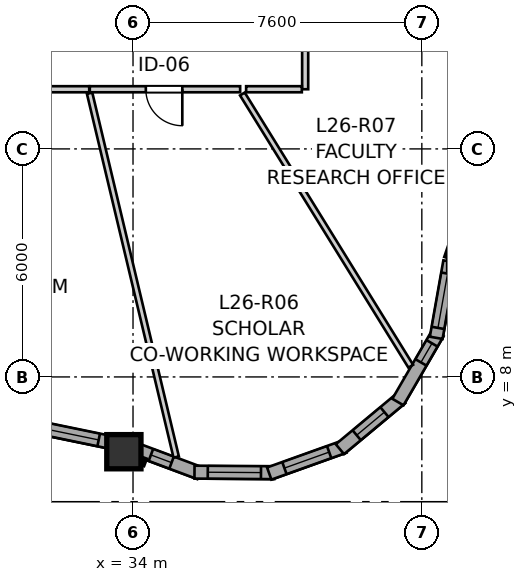
"""IFC4 building model, lengths in metres.
Left out: names, types, materials, properties, quantities, classifications, styles, units other than length and angle.
Written with IfcOpenShell. Run it as: python <this file> out.ifc"""

import sys

from ifc_helpers import new_model, si_unit, direction, frame, frame_2d, origin, origin_2d, place, context, subcontext, project, spatial, rectangle, extrude, source, transform, mapped, element, fill, save


model = new_model("IFC4")
c1 = context("Model", 3, precision=1e-05, world=origin(), true_north=direction((0.0, 1.0)))
c2 = subcontext(c1, "Body", "Model", "MODEL_VIEW")
j1 = project(units=[si_unit("LENGTHUNIT", "METRE"), si_unit("PLANEANGLEUNIT", "RADIAN")], contexts=[c1])
p1 = place(None, origin())
s1 = spatial("IfcSite", under=j1, at=p1, CompositionType="ELEMENT")
p2 = place(p1, origin())
s2 = spatial("IfcBuilding", under=s1, at=p2, CompositionType="ELEMENT")
p3 = place(p2, frame((0.0, 0.0, 89.6)))
s3 = spatial("IfcBuildingStorey", under=s2, at=p3, CompositionType="ELEMENT", Elevation=89.6)
m1 = source(origin(), c2, "Body", "SweptSolid", [
    extrude(rectangle(XDim=0.9, YDim=0.9, at=origin_2d()), origin(), (0.0, 0.0, 1.0), 2.95),
])
p4 = place(p3, frame((33.76, 6.032, 0.0), z_axis=(0.0, 0.0, 1.0), x_axis=(1.0, 0.0, 0.0)))
e1 = element("IfcColumn", 1, at=p4, inside=s3, PredefinedType="COLUMN", context=c2, shape_type="MappedRepresentation", body=[
    mapped(m1, transform((0.0, 0.0, 0.0), x_axis=(1.0, 0.0, 0.0), y_axis=(0.0, 1.0, 0.0), z_axis=(0.0, 0.0, 1.0), scale=1.0)),
])
p5 = place(p3, frame((30.705, 6.835, 0.0), z_axis=(0.0, 0.0, 1.0), x_axis=(0.979433750273, -0.201766024954, 0.0)))
e2 = element("IfcWall", 2, at=p5, inside=s3, PredefinedType="SOLIDWALL", context=c2, shape_type="SweptSolid", body=[
    extrude(rectangle(XDim=2.923, YDim=0.34, at=frame_2d((1.462, 0.0))), origin(), (0.0, 0.0, 1.0), 2.48),
])
p6 = place(p5, frame((0.492, 0.0, 0.82)))
e3 = element("IfcOpeningElement", 3, at=p6, cuts=e2, PredefinedType="OPENING", context=c2, shape_type="SweptSolid", body=[
    extrude(rectangle(XDim=1.95, YDim=1.4, at=frame_2d((0.975, 0.7))), frame((0.0, 0.18, 0.0), z_axis=(0.0, -1.0, 0.0), x_axis=(1.0, 0.0, 0.0)), (0.0, 0.0, 1.0), 0.36),
])
p7 = place(p3, frame((34.034, 6.111, 0.0), z_axis=(0.0, 0.0, 1.0), x_axis=(0.936815884802, -0.349822809409, 0.0)))
e4 = element("IfcWall", 4, at=p7, inside=s3, PredefinedType="SOLIDWALL", context=c2, shape_type="SweptSolid", body=[
    extrude(rectangle(XDim=1.831, YDim=0.34, at=frame_2d((0.916, 0.0))), origin(), (0.0, 0.0, 1.0), 2.48),
])
p8 = place(p7, frame((0.466, 0.0, 0.82)))
e5 = element("IfcOpeningElement", 5, at=p8, cuts=e4, PredefinedType="OPENING", context=c2, shape_type="SweptSolid", body=[
    extrude(rectangle(XDim=0.58, YDim=1.35, at=frame_2d((0.29, 0.675))), frame((0.0, 0.18, 0.0), z_axis=(0.0, -1.0, 0.0), x_axis=(1.0, 0.0, 0.0)), (0.0, 0.0, 1.0), 0.36),
])
p9 = place(p3, frame((35.618, 5.495, 0.0), z_axis=(0.0, 0.0, 1.0), x_axis=(0.999976451414, -0.006862697526, 0.0)))
e6 = element("IfcWall", 6, at=p9, inside=s3, PredefinedType="SOLIDWALL", context=c2, shape_type="SweptSolid", body=[
    extrude(rectangle(XDim=2.099, YDim=0.34, at=frame_2d((1.049, 0.0))), origin(), (0.0, 0.0, 1.0), 2.48),
])
p10 = place(p9, frame((0.35, 0.0, 0.82)))
e7 = element("IfcOpeningElement", 7, at=p10, cuts=e6, PredefinedType="OPENING", context=c2, shape_type="SweptSolid", body=[
    extrude(rectangle(XDim=1.4, YDim=1.35, at=frame_2d((0.7, 0.675))), frame((0.0, 0.18, 0.0), z_axis=(0.0, -1.0, 0.0), x_axis=(1.0, 0.0, 0.0)), (0.0, 0.0, 1.0), 0.36),
])
p11 = place(p3, frame((37.584, 5.458, 0.0), z_axis=(0.0, 0.0, 1.0), x_axis=(0.941473186867, 0.33708787936, 0.0)))
e8 = element("IfcWall", 8, at=p11, inside=s3, PredefinedType="SOLIDWALL", context=c2, shape_type="SweptSolid", body=[
    extrude(rectangle(XDim=2.099, YDim=0.34, at=frame_2d((1.049, 0.0))), origin(), (0.0, 0.0, 1.0), 2.48),
])
p12 = place(p11, frame((0.425, 0.0, 0.82)))
e9 = element("IfcOpeningElement", 9, at=p12, cuts=e8, PredefinedType="OPENING", context=c2, shape_type="SweptSolid", body=[
    extrude(rectangle(XDim=1.25, YDim=1.35, at=frame_2d((0.625, 0.675))), frame((0.0, 0.18, 0.0), z_axis=(0.0, -1.0, 0.0), x_axis=(1.0, 0.0, 0.0)), (0.0, 0.0, 1.0), 0.36),
])
p13 = place(p3, frame((39.444, 6.099, 0.0), z_axis=(0.0, 0.0, 1.0), x_axis=(0.768497696041, 0.639852554249, 0.0)))
e10 = element("IfcWall", 10, at=p13, inside=s3, PredefinedType="SOLIDWALL", context=c2, shape_type="SweptSolid", body=[
    extrude(rectangle(XDim=2.099, YDim=0.34, at=frame_2d((1.049, 0.0))), origin(), (0.0, 0.0, 1.0), 2.48),
])
p14 = place(p13, frame((0.574, 0.0, 0.82)))
e11 = element("IfcOpeningElement", 11, at=p14, cuts=e10, PredefinedType="OPENING", context=c2, shape_type="SweptSolid", body=[
    extrude(rectangle(XDim=0.95, YDim=1.35, at=frame_2d((0.475, 0.675))), frame((0.0, 0.18, 0.0), z_axis=(0.0, -1.0, 0.0), x_axis=(1.0, 0.0, 0.0)), (0.0, 0.0, 1.0), 0.36),
])
p15 = place(p3, frame((40.971, 7.34, 0.0), z_axis=(0.0, 0.0, 1.0), x_axis=(0.501902596059, 0.864924149315, 0.0)))
e12 = element("IfcWall", 12, at=p15, inside=s3, PredefinedType="SOLIDWALL", context=c2, shape_type="SweptSolid", body=[
    extrude(rectangle(XDim=2.099, YDim=0.34, at=frame_2d((1.049, 0.0))), origin(), (0.0, 0.0, 1.0), 2.48),
])
p16 = place(p15, frame((1.206, 0.0, 0.82)))
e13 = element("IfcOpeningElement", 13, at=p16, cuts=e12, PredefinedType="OPENING", context=c2, shape_type="SweptSolid", body=[
    extrude(rectangle(XDim=0.58, YDim=1.35, at=frame_2d((0.29, 0.675))), frame((0.0, 0.18, 0.0), z_axis=(0.0, -1.0, 0.0), x_axis=(1.0, 0.0, 0.0)), (0.0, 0.0, 1.0), 0.36),
])
p17 = place(p3, frame((41.978, 9.029, 0.0), z_axis=(0.0, 0.0, 1.0), x_axis=(0.174283452483, 0.984695525627, 0.0)))
e14 = element("IfcWall", 14, at=p17, inside=s3, PredefinedType="SOLIDWALL", context=c2, shape_type="SweptSolid", body=[
    extrude(rectangle(XDim=2.041, YDim=0.34, at=frame_2d((1.021, 0.0))), origin(), (0.0, 0.0, 1.0), 2.48),
])
p18 = place(p17, frame((0.265, 0.0, 0.82)))
e15 = element("IfcOpeningElement", 15, at=p18, cuts=e14, PredefinedType="OPENING", context=c2, shape_type="SweptSolid", body=[
    extrude(rectangle(XDim=1.45, YDim=1.25, at=frame_2d((0.725, 0.625))), frame((0.0, 0.18, 0.0), z_axis=(0.0, -1.0, 0.0), x_axis=(1.0, 0.0, 0.0)), (0.0, 0.0, 1.0), 0.36),
])
p19 = place(p3, frame((42.351, 11.103, 0.0), z_axis=(0.0, 0.0, 1.0), x_axis=(0.323582854182, 0.946199839611, 0.0)))
e16 = element("IfcWall", 16, at=p19, inside=s3, PredefinedType="SOLIDWALL", context=c2, shape_type="SweptSolid", body=[
    extrude(rectangle(XDim=3.182, YDim=0.34, at=frame_2d((1.591, 0.0))), origin(), (0.0, 0.0, 1.0), 2.48),
])
p20 = place(p19, frame((0.856, 0.0, 0.82)))
e17 = element("IfcOpeningElement", 17, at=p20, cuts=e16, PredefinedType="OPENING", context=c2, shape_type="SweptSolid", body=[
    extrude(rectangle(XDim=1.45, YDim=1.25, at=frame_2d((0.725, 0.625))), frame((0.0, 0.18, 0.0), z_axis=(0.0, -1.0, 0.0), x_axis=(1.0, 0.0, 0.0)), (0.0, 0.0, 1.0), 0.36),
])
p21 = place(p3, frame((38.53, 21.281, 0.0), z_axis=(0.0, 0.0, 1.0), x_axis=(0.0, -1.0, 0.0)))
e18 = element("IfcWall", 18, at=p21, inside=s3, PredefinedType="PARTITIONING", context=c2, shape_type="SweptSolid", body=[
    extrude(rectangle(XDim=5.711, YDim=0.16, at=frame_2d((2.855, 0.0))), origin(), (0.0, 0.0, 1.0), 2.95),
])
p22 = place(p21, frame((2.384, 0.0, 0.0)))
e19 = element("IfcOpeningElement", 19, at=p22, cuts=e18, PredefinedType="OPENING", context=c2, shape_type="SweptSolid", body=[
    extrude(rectangle(XDim=0.96, YDim=2.1, at=frame_2d((0.48, 1.05))), frame((0.0, 0.09, 0.0), z_axis=(0.0, -1.0, 0.0), x_axis=(1.0, 0.0, 0.0)), (0.0, 0.0, 1.0), 0.18),
])
p23 = place(p3, frame((32.848, 15.57, 0.0), z_axis=(0.0, 0.0, 1.0), x_axis=(-1.0, 0.0, 0.0)))
e20 = element("IfcWall", 20, at=p23, inside=s3, PredefinedType="PARTITIONING", context=c2, shape_type="SweptSolid", body=[
    extrude(rectangle(XDim=5.621, YDim=0.16, at=frame_2d((2.811, 0.0))), origin(), (0.0, 0.0, 1.0), 2.95),
])
p24 = place(p23, frame((2.16, 0.0, 0.0)))
e21 = element("IfcOpeningElement", 21, at=p24, cuts=e20, PredefinedType="OPENING", context=c2, shape_type="SweptSolid", body=[
    extrude(rectangle(XDim=1.3, YDim=2.1, at=frame_2d((0.65, 1.05))), frame((0.0, 0.09, 0.0), z_axis=(0.0, -1.0, 0.0), x_axis=(1.0, 0.0, 0.0)), (0.0, 0.0, 1.0), 0.18),
])
p25 = place(p3, frame((36.819, 15.57, 0.0), z_axis=(0.0, 0.0, 1.0), x_axis=(-1.0, 0.0, 0.0)))
e22 = element("IfcWall", 22, at=p25, inside=s3, PredefinedType="PARTITIONING", context=c2, shape_type="SweptSolid", body=[
    extrude(rectangle(XDim=3.956, YDim=0.16, at=frame_2d((1.978, 0.0))), origin(), (0.0, 0.0, 1.0), 2.95),
])
p26 = place(p25, frame((1.522, 0.0, 0.0)))
e23 = element("IfcOpeningElement", 23, at=p26, cuts=e22, PredefinedType="OPENING", context=c2, shape_type="SweptSolid", body=[
    extrude(rectangle(XDim=0.96, YDim=2.1, at=frame_2d((0.48, 1.05))), frame((0.0, 0.09, 0.0), z_axis=(0.0, -1.0, 0.0), x_axis=(1.0, 0.0, 0.0)), (0.0, 0.0, 1.0), 0.18),
])
p27 = place(p3, frame((32.858, 15.465, 0.0), z_axis=(0.0, 0.0, 1.0), x_axis=(0.231516552249, -0.97283096478, 0.0)))
e24 = element("IfcWall", 24, at=p27, inside=s3, PredefinedType="PARTITIONING", context=c2, shape_type="SweptSolid", body=[
    extrude(rectangle(XDim=9.841, YDim=0.145, at=frame_2d((4.92, 0.0))), origin(), (0.0, 0.0, 1.0), 2.95),
])
p28 = place(p3, frame((36.878, 15.445, 0.0), z_axis=(0.0, 0.0, 1.0), x_axis=(0.526001305793, -0.850483760165, 0.0)))
e25 = element("IfcWall", 25, at=p28, inside=s3, PredefinedType="PARTITIONING", context=c2, shape_type="SweptSolid", body=[
    extrude(rectangle(XDim=8.422, YDim=0.145, at=frame_2d((4.211, 0.0))), origin(), (0.0, 0.0, 1.0), 2.95),
])
p29 = place(p3, frame((36.977, 15.57, 0.0), z_axis=(0.0, 0.0, 1.0), x_axis=(1.0, 0.0, 0.0)))
e26 = element("IfcWall", 26, at=p29, inside=s3, PredefinedType="PARTITIONING", context=c2, shape_type="SweptSolid", body=[
    extrude(rectangle(XDim=1.465, YDim=0.16, at=frame_2d((0.732, 0.0))), origin(), (0.0, 0.0, 1.0), 2.95),
])
m2 = source(origin(), c2, "Body", "SweptSolid", [
    extrude(rectangle(XDim=1.95, YDim=1.4, at=frame_2d((0.975, 0.7))), frame((0.0, 0.03, 0.0), z_axis=(0.0, -1.0, 0.0), x_axis=(1.0, 0.0, 0.0)), (0.0, 0.0, 1.0), 0.06),
])
p30 = place(p6, origin())
e27 = element("IfcWindow", 27, at=p30, inside=s3, PartitioningType="SINGLE_PANEL", PredefinedType="WINDOW", context=c2, shape_type="MappedRepresentation", body=[
    mapped(m2, transform((0.0, 0.0, 0.0), x_axis=(1.0, 0.0, 0.0), y_axis=(0.0, 1.0, 0.0), z_axis=(0.0, 0.0, 1.0), scale=1.0)),
])
fill(e3, e27)
m3 = source(origin(), c2, "Body", "SweptSolid", [
    extrude(rectangle(XDim=0.58, YDim=1.35, at=frame_2d((0.29, 0.675))), frame((0.0, 0.03, 0.0), z_axis=(0.0, -1.0, 0.0), x_axis=(1.0, 0.0, 0.0)), (0.0, 0.0, 1.0), 0.06),
])
p31 = place(p8, origin())
e28 = element("IfcWindow", 28, at=p31, inside=s3, PartitioningType="SINGLE_PANEL", PredefinedType="WINDOW", context=c2, shape_type="MappedRepresentation", body=[
    mapped(m3, transform((0.0, 0.0, 0.0), x_axis=(1.0, 0.0, 0.0), y_axis=(0.0, 1.0, 0.0), z_axis=(0.0, 0.0, 1.0), scale=1.0)),
])
fill(e5, e28)
m4 = source(origin(), c2, "Body", "SweptSolid", [
    extrude(rectangle(XDim=1.4, YDim=1.35, at=frame_2d((0.7, 0.675))), frame((0.0, 0.03, 0.0), z_axis=(0.0, -1.0, 0.0), x_axis=(1.0, 0.0, 0.0)), (0.0, 0.0, 1.0), 0.06),
])
p32 = place(p10, origin())
e29 = element("IfcWindow", 29, at=p32, inside=s3, PartitioningType="SINGLE_PANEL", PredefinedType="WINDOW", context=c2, shape_type="MappedRepresentation", body=[
    mapped(m4, transform((0.0, 0.0, 0.0), x_axis=(1.0, 0.0, 0.0), y_axis=(0.0, 1.0, 0.0), z_axis=(0.0, 0.0, 1.0), scale=1.0)),
])
fill(e7, e29)
m5 = source(origin(), c2, "Body", "SweptSolid", [
    extrude(rectangle(XDim=1.25, YDim=1.35, at=frame_2d((0.625, 0.675))), frame((0.0, 0.03, 0.0), z_axis=(0.0, -1.0, 0.0), x_axis=(1.0, 0.0, 0.0)), (0.0, 0.0, 1.0), 0.06),
])
p33 = place(p12, origin())
e30 = element("IfcWindow", 30, at=p33, inside=s3, PartitioningType="SINGLE_PANEL", PredefinedType="WINDOW", context=c2, shape_type="MappedRepresentation", body=[
    mapped(m5, transform((0.0, 0.0, 0.0), x_axis=(1.0, 0.0, 0.0), y_axis=(0.0, 1.0, 0.0), z_axis=(0.0, 0.0, 1.0), scale=1.0)),
])
fill(e9, e30)
m6 = source(origin(), c2, "Body", "SweptSolid", [
    extrude(rectangle(XDim=0.95, YDim=1.35, at=frame_2d((0.475, 0.675))), frame((0.0, 0.03, 0.0), z_axis=(0.0, -1.0, 0.0), x_axis=(1.0, 0.0, 0.0)), (0.0, 0.0, 1.0), 0.06),
])
p34 = place(p14, origin())
e31 = element("IfcWindow", 31, at=p34, inside=s3, PartitioningType="SINGLE_PANEL", PredefinedType="WINDOW", context=c2, shape_type="MappedRepresentation", body=[
    mapped(m6, transform((0.0, 0.0, 0.0), x_axis=(1.0, 0.0, 0.0), y_axis=(0.0, 1.0, 0.0), z_axis=(0.0, 0.0, 1.0), scale=1.0)),
])
fill(e11, e31)
p35 = place(p16, origin())
e32 = element("IfcWindow", 32, at=p35, inside=s3, PartitioningType="SINGLE_PANEL", PredefinedType="WINDOW", context=c2, shape_type="MappedRepresentation", body=[
    mapped(m3, transform((0.0, 0.0, 0.0), x_axis=(1.0, 0.0, 0.0), y_axis=(0.0, 1.0, 0.0), z_axis=(0.0, 0.0, 1.0), scale=1.0)),
])
fill(e13, e32)
m7 = source(origin(), c2, "Body", "SweptSolid", [
    extrude(rectangle(XDim=1.45, YDim=1.25, at=frame_2d((0.725, 0.625))), frame((0.0, 0.03, 0.0), z_axis=(0.0, -1.0, 0.0), x_axis=(1.0, 0.0, 0.0)), (0.0, 0.0, 1.0), 0.06),
])
p36 = place(p18, origin())
e33 = element("IfcWindow", 33, at=p36, inside=s3, PartitioningType="SINGLE_PANEL", PredefinedType="WINDOW", context=c2, shape_type="MappedRepresentation", body=[
    mapped(m7, transform((0.0, 0.0, 0.0), x_axis=(1.0, 0.0, 0.0), y_axis=(0.0, 1.0, 0.0), z_axis=(0.0, 0.0, 1.0), scale=1.0)),
])
fill(e15, e33)
m8 = source(origin(), c2, "Body", "SweptSolid", [
    extrude(rectangle(XDim=0.96, YDim=2.1, at=frame_2d((0.48, 1.05))), frame((0.0, 0.025, 0.0), z_axis=(0.0, -1.0, 0.0), x_axis=(1.0, 0.0, 0.0)), (0.0, 0.0, 1.0), 0.05),
])
p37 = place(p26, origin())
e34 = element("IfcDoor", 34, at=p37, inside=s3, OperationType="SINGLE_SWING_LEFT", PredefinedType="DOOR", context=c2, shape_type="MappedRepresentation", body=[
    mapped(m8, transform((0.0, 0.0, 0.0), x_axis=(1.0, 0.0, 0.0), y_axis=(0.0, 1.0, 0.0), z_axis=(0.0, 0.0, 1.0), scale=1.0)),
])
fill(e23, e34)
save(model, sys.argv[1])
